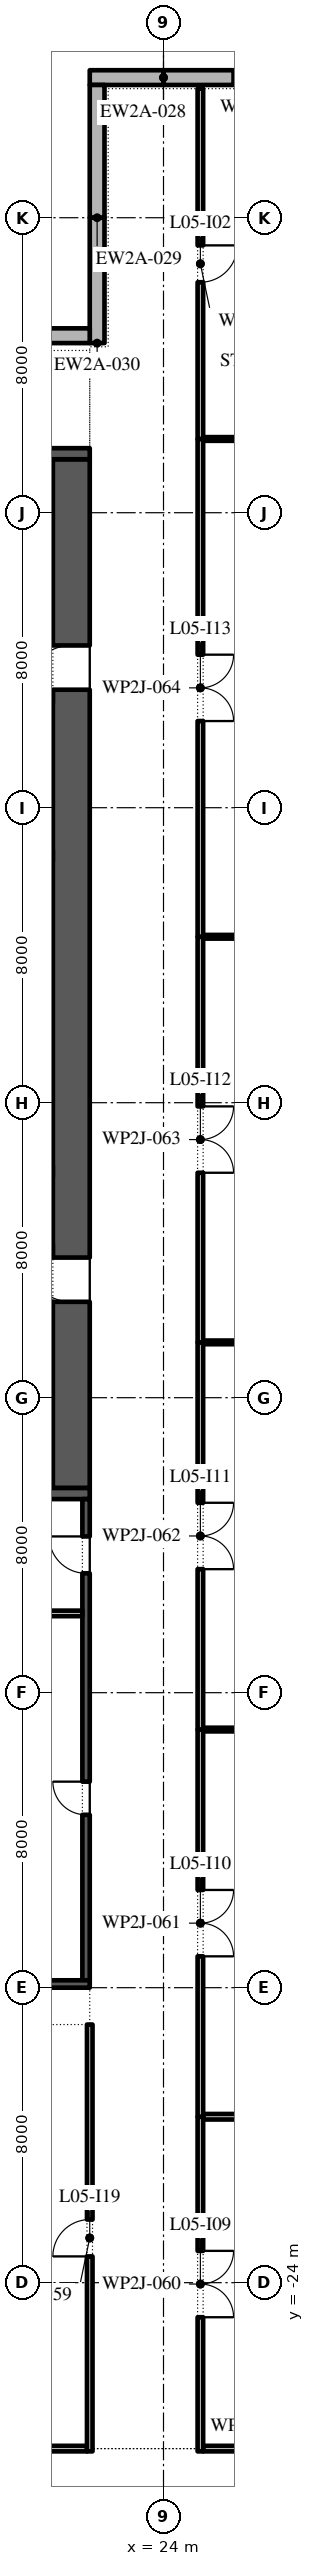
"""IFC4 building model, lengths in metres.
Left out: names, types, materials, properties, quantities, classifications, styles, units other than length and angle.
Written with IfcOpenShell. Run it as: python <this file> out.ifc"""

import sys

from ifc_helpers import new_model, si_unit, direction, frame, frame_2d, origin, place, context, subcontext, project, spatial, polyline, rectangle, outline, extrude, element, fill, save


model = new_model("IFC4")
c1 = context("Model", 3, precision=1e-05, world=origin(), true_north=direction((0.0, 1.0)))
c2 = subcontext(c1, "Body", "Model", "MODEL_VIEW")
j1 = project(units=[si_unit("LENGTHUNIT", "METRE"), si_unit("PLANEANGLEUNIT", "RADIAN")], contexts=[c1])
p1 = place(None, origin())
s1 = spatial("IfcSite", under=j1, at=p1, CompositionType="ELEMENT")
p2 = place(p1, origin())
s2 = spatial("IfcBuilding", under=s1, at=p2, CompositionType="ELEMENT")
p3 = place(p2, frame((0.0, 0.0, 28.8)))
s3 = spatial("IfcBuildingStorey", under=s2, at=p3, CompositionType="ELEMENT", Elevation=28.8)
p4 = place(p3, frame((32.0, 35.8, 0.0), z_axis=(0.0, 0.0, 1.0), x_axis=(-1.0, 0.0, 0.0)))
e1 = element("IfcWall", 1, at=p4, inside=s3, PredefinedType="STANDARD", context=c2, shape_type="SweptSolid", body=[
    extrude(rectangle(XDim=8.0, YDim=0.4, at=frame_2d((4.0, 0.0))), origin(), (0.0, 0.0, 1.0), 4.35),
])
p5 = place(p4, frame((1.9, 0.0, 0.9)))
e2 = element("IfcOpeningElement", 2, at=p5, cuts=e1, PredefinedType="OPENING", context=c2, shape_type="SweptSolid", body=[
    extrude(outline(polyline([(0.0, 0.0), (1.8, 0.0), (1.8, 1.425), (1.784, 1.646), (1.738, 1.864), (1.661, 2.072), (1.556, 2.268), (1.425, 2.447), (1.269, 2.605), (1.093, 2.741), (0.9, 2.85), (0.707, 2.741), (0.531, 2.605), (0.375, 2.447), (0.244, 2.268), (0.139, 2.072), (0.062, 1.864), (0.016, 1.646), (0.0, 1.425), (0.0, 0.0)])), frame((0.0, 0.21, 0.0), z_axis=(0.0, -1.0, 0.0), x_axis=(1.0, 0.0, 0.0)), (0.0, 0.0, 1.0), 0.42),
])
p6 = place(p4, frame((4.3, 0.0, 0.9)))
e3 = element("IfcOpeningElement", 3, at=p6, cuts=e1, PredefinedType="OPENING", context=c2, shape_type="SweptSolid", body=[
    extrude(outline(polyline([(0.0, 0.0), (1.8, 0.0), (1.8, 1.425), (1.784, 1.646), (1.738, 1.864), (1.661, 2.072), (1.556, 2.268), (1.425, 2.447), (1.269, 2.605), (1.093, 2.741), (0.9, 2.85), (0.707, 2.741), (0.531, 2.605), (0.375, 2.447), (0.244, 2.268), (0.139, 2.072), (0.062, 1.864), (0.016, 1.646), (0.0, 1.425), (0.0, 0.0)])), frame((0.0, 0.21, 0.0), z_axis=(0.0, -1.0, 0.0), x_axis=(1.0, 0.0, 0.0)), (0.0, 0.0, 1.0), 0.42),
])
p7 = place(p3, frame((24.0, 35.8, 0.0), z_axis=(0.0, 0.0, 1.0), x_axis=(-1.0, 0.0, 0.0)))
e4 = element("IfcWall", 4, at=p7, inside=s3, PredefinedType="STANDARD", context=c2, shape_type="SweptSolid", body=[
    extrude(rectangle(XDim=2.0, YDim=0.4, at=frame_2d((1.0, 0.0))), origin(), (0.0, 0.0, 1.0), 4.35),
])
p8 = place(p3, frame((22.2, 35.6, 0.0), z_axis=(0.0, 0.0, 1.0), x_axis=(0.0, -1.0, 0.0)))
e5 = element("IfcWall", 5, at=p8, inside=s3, PredefinedType="STANDARD", context=c2, shape_type="SweptSolid", body=[
    extrude(rectangle(XDim=3.6, YDim=0.4, at=frame_2d((1.8, 0.0))), origin(), (0.0, 0.0, 1.0), 4.35),
])
p9 = place(p3, frame((22.2, 32.0, 0.0), z_axis=(0.0, 0.0, 1.0), x_axis=(0.0, -1.0, 0.0)))
e6 = element("IfcWall", 6, at=p9, inside=s3, PredefinedType="STANDARD", context=c2, shape_type="SweptSolid", body=[
    extrude(rectangle(XDim=3.4, YDim=0.4, at=frame_2d((1.7, 0.0))), origin(), (0.0, 0.0, 1.0), 4.35),
])
p10 = place(p3, frame((22.0, 28.8, 0.0), z_axis=(0.0, 0.0, 1.0), x_axis=(-1.0, 0.0, 0.0)))
e7 = element("IfcWall", 7, at=p10, inside=s3, PredefinedType="STANDARD", context=c2, shape_type="SweptSolid", body=[
    extrude(rectangle(XDim=6.0, YDim=0.4, at=frame_2d((3.0, 0.0))), origin(), (0.0, 0.0, 1.0), 4.35),
])
p11 = place(p3, frame((21.5, -2.45, 0.0), z_axis=(0.0, 0.0, 1.0), x_axis=(0.0, 1.0, 0.0)))
e8 = element("IfcWall", 8, at=p11, inside=s3, PredefinedType="SHEAR", context=c2, shape_type="SweptSolid", body=[
    extrude(rectangle(XDim=27.9, YDim=1.0, at=frame_2d((13.95, 0.0))), origin(), (0.0, 0.0, 1.0), 4.35),
])
p12 = place(p11, frame((5.05, 0.0, 0.0)))
e9 = element("IfcOpeningElement", 9, at=p12, cuts=e8, PredefinedType="OPENING", context=c2, shape_type="SweptSolid", body=[
    extrude(rectangle(XDim=1.2, YDim=2.1, at=frame_2d((0.6, 1.05))), frame((0.0, 0.51, 0.0), z_axis=(0.0, -1.0, 0.0), x_axis=(1.0, 0.0, 0.0)), (0.0, 0.0, 1.0), 1.02),
])
p13 = place(p11, frame((21.65, 0.0, 0.0)))
e10 = element("IfcOpeningElement", 10, at=p13, cuts=e8, PredefinedType="OPENING", context=c2, shape_type="SweptSolid", body=[
    extrude(rectangle(XDim=1.2, YDim=2.1, at=frame_2d((0.6, 1.05))), frame((0.0, 0.51, 0.0), z_axis=(0.0, -1.0, 0.0), x_axis=(1.0, 0.0, 0.0)), (0.0, 0.0, 1.0), 1.02),
])
for number, where, z_axis, x_axis in (
    (11, (10.0, -2.6, 0.0), (0.0, 0.0, 1.0), (1.0, 0.0, 0.0)),
    (12, (10.0, 25.6, 0.0), (0.0, 0.0, 1.0), (1.0, 0.0, 0.0)),
):
    element("IfcWall", number, at=place(p3, frame(where, z_axis=z_axis, x_axis=x_axis)), inside=s3, PredefinedType="SHEAR", context=c2, shape_type="SweptSolid", body=[
        extrude(rectangle(XDim=12.0, YDim=0.3, at=frame_2d((6.0, 0.0))), origin(), (0.0, 0.0, 1.0), 4.35),
    ])
for number, where, z_axis, x_axis in (
    (13, (17.3, 4.0, 0.0), (0.0, 0.0, 1.0), (1.0, 0.0, 0.0)),
    (14, (17.3, 19.0, 0.0), (0.0, 0.0, 1.0), (1.0, 0.0, 0.0)),
):
    element("IfcWall", number, at=place(p3, frame(where, z_axis=z_axis, x_axis=x_axis)), inside=s3, PredefinedType="SHEAR", context=c2, shape_type="SweptSolid", body=[
        extrude(rectangle(XDim=3.7, YDim=0.3, at=frame_2d((1.85, 0.0))), origin(), (0.0, 0.0, 1.0), 4.35),
    ])
p14 = place(p3, frame((21.9, -15.8, 0.0), z_axis=(0.0, 0.0, 1.0), x_axis=(0.0, 1.0, 0.0)))
e15 = element("IfcWall", 15, at=p14, inside=s3, PredefinedType="SHEAR", context=c2, shape_type="SweptSolid", body=[
    extrude(rectangle(XDim=13.05, YDim=0.2, at=frame_2d((6.525, 0.0))), origin(), (0.0, 0.0, 1.0), 4.35),
])
p15 = place(p14, frame((4.488, 0.0, 0.0)))
e16 = element("IfcOpeningElement", 16, at=p15, cuts=e15, PredefinedType="OPENING", context=c2, shape_type="SweptSolid", body=[
    extrude(rectangle(XDim=0.9, YDim=2.1, at=frame_2d((0.45, 1.05))), frame((0.0, 0.11, 0.0), z_axis=(0.0, -1.0, 0.0), x_axis=(1.0, 0.0, 0.0)), (0.0, 0.0, 1.0), 0.22),
])
p16 = place(p14, frame((11.038, 0.0, 0.0)))
e17 = element("IfcOpeningElement", 17, at=p16, cuts=e15, PredefinedType="OPENING", context=c2, shape_type="SweptSolid", body=[
    extrude(rectangle(XDim=1.0, YDim=2.1, at=frame_2d((0.5, 1.05))), frame((0.0, 0.11, 0.0), z_axis=(0.0, -1.0, 0.0), x_axis=(1.0, 0.0, 0.0)), (0.0, 0.0, 1.0), 0.22),
])
p17 = place(p3, frame((10.0, -15.9, 0.0), z_axis=(0.0, 0.0, 1.0), x_axis=(1.0, 0.0, 0.0)))
e18 = element("IfcWall", 18, at=p17, inside=s3, PredefinedType="SHEAR", context=c2, shape_type="SweptSolid", body=[
    extrude(rectangle(XDim=12.0, YDim=0.2, at=frame_2d((6.0, 0.0))), origin(), (0.0, 0.0, 1.0), 4.35),
])
p18 = place(p3, frame((16.075, -5.85, 0.0), z_axis=(0.0, 0.0, 1.0), x_axis=(1.0, 0.0, 0.0)))
e19 = element("IfcWall", 19, at=p18, inside=s3, PredefinedType="PARTITIONING", context=c2, shape_type="SweptSolid", body=[
    extrude(rectangle(XDim=5.725, YDim=0.15, at=frame_2d((2.863, 0.0))), origin(), (0.0, 0.0, 1.0), 4.35),
])
p19 = place(p3, frame((10.4, -28.5, 0.0), z_axis=(0.0, 0.0, 1.0), x_axis=(1.0, 0.0, 0.0)))
e20 = element("IfcWall", 20, at=p19, inside=s3, PredefinedType="PARTITIONING", context=c2, shape_type="SweptSolid", body=[
    extrude(rectangle(XDim=11.525, YDim=0.15, at=frame_2d((5.763, 0.0))), origin(), (0.0, 0.0, 1.0), 4.35),
])
p20 = place(p3, frame((25.075, -28.5, 0.0), z_axis=(0.0, 0.0, 1.0), x_axis=(1.0, 0.0, 0.0)))
e21 = element("IfcWall", 21, at=p20, inside=s3, PredefinedType="PARTITIONING", context=c2, shape_type="SweptSolid", body=[
    extrude(rectangle(XDim=1.925, YDim=0.15, at=frame_2d((0.962, 0.0))), origin(), (0.0, 0.0, 1.0), 4.35),
])
p21 = place(p3, frame((25.075, -19.5, 0.0), z_axis=(0.0, 0.0, 1.0), x_axis=(1.0, 0.0, 0.0)))
e22 = element("IfcWall", 22, at=p21, inside=s3, PredefinedType="PARTITIONING", context=c2, shape_type="SweptSolid", body=[
    extrude(rectangle(XDim=6.625, YDim=0.15, at=frame_2d((3.312, 0.0))), origin(), (0.0, 0.0, 1.0), 4.35),
])
p22 = place(p3, frame((25.075, -9.0, 0.0), z_axis=(0.0, 0.0, 1.0), x_axis=(1.0, 0.0, 0.0)))
e23 = element("IfcWall", 23, at=p22, inside=s3, PredefinedType="PARTITIONING", context=c2, shape_type="SweptSolid", body=[
    extrude(rectangle(XDim=16.425, YDim=0.1, at=frame_2d((8.212, 0.0))), origin(), (0.0, 0.0, 1.0), 4.35),
])
p23 = place(p3, frame((25.075, 1.5, 0.0), z_axis=(0.0, 0.0, 1.0), x_axis=(1.0, 0.0, 0.0)))
e24 = element("IfcWall", 24, at=p23, inside=s3, PredefinedType="PARTITIONING", context=c2, shape_type="SweptSolid", body=[
    extrude(rectangle(XDim=18.425, YDim=0.1, at=frame_2d((9.212, 0.0))), origin(), (0.0, 0.0, 1.0), 4.35),
])
p24 = place(p3, frame((25.075, 12.5, 0.0), z_axis=(0.0, 0.0, 1.0), x_axis=(1.0, 0.0, 0.0)))
e25 = element("IfcWall", 25, at=p24, inside=s3, PredefinedType="PARTITIONING", context=c2, shape_type="SweptSolid", body=[
    extrude(rectangle(XDim=6.625, YDim=0.1, at=frame_2d((3.312, 0.0))), origin(), (0.0, 0.0, 1.0), 4.35),
])
p25 = place(p3, frame((25.075, 26.0, 0.0), z_axis=(0.0, 0.0, 1.0), x_axis=(1.0, 0.0, 0.0)))
e26 = element("IfcWall", 26, at=p25, inside=s3, PredefinedType="PARTITIONING", context=c2, shape_type="SweptSolid", body=[
    extrude(rectangle(XDim=8.925, YDim=0.1, at=frame_2d((4.462, 0.0))), origin(), (0.0, 0.0, 1.0), 4.35),
])
p26 = place(p3, frame((22.0, -28.575, 0.0), z_axis=(0.0, 0.0, 1.0), x_axis=(0.0, 1.0, 0.0)))
e27 = element("IfcWall", 27, at=p26, inside=s3, PredefinedType="PARTITIONING", context=c2, shape_type="SweptSolid", body=[
    extrude(rectangle(XDim=11.575, YDim=0.15, at=frame_2d((5.788, 0.0))), origin(), (0.0, 0.0, 1.0), 4.35),
])
p27 = place(p26, frame((5.288, 0.0, 0.0)))
e28 = element("IfcOpeningElement", 28, at=p27, cuts=e27, PredefinedType="OPENING", context=c2, shape_type="SweptSolid", body=[
    extrude(rectangle(XDim=1.0, YDim=2.1, at=frame_2d((0.5, 1.05))), frame((0.0, 0.085, 0.0), z_axis=(0.0, -1.0, 0.0), x_axis=(1.0, 0.0, 0.0)), (0.0, 0.0, 1.0), 0.17),
])
p28 = place(p3, frame((25.0, -28.575, 0.0), z_axis=(0.0, 0.0, 1.0), x_axis=(0.0, 1.0, 0.0)))
e29 = element("IfcWall", 29, at=p28, inside=s3, PredefinedType="PARTITIONING", context=c2, shape_type="SweptSolid", body=[
    extrude(rectangle(XDim=9.075, YDim=0.15, at=frame_2d((4.538, 0.0))), origin(), (0.0, 0.0, 1.0), 4.35),
])
p29 = place(p28, frame((3.637, 0.0, 0.0)))
e30 = element("IfcOpeningElement", 30, at=p29, cuts=e29, PredefinedType="OPENING", context=c2, shape_type="SweptSolid", body=[
    extrude(rectangle(XDim=1.8, YDim=2.1, at=frame_2d((0.9, 1.05))), frame((0.0, 0.085, 0.0), z_axis=(0.0, -1.0, 0.0), x_axis=(1.0, 0.0, 0.0)), (0.0, 0.0, 1.0), 0.17),
])
p30 = place(p3, frame((25.0, -19.5, 0.0), z_axis=(0.0, 0.0, 1.0), x_axis=(0.0, 1.0, 0.0)))
e31 = element("IfcWall", 31, at=p30, inside=s3, PredefinedType="PARTITIONING", context=c2, shape_type="SweptSolid", body=[
    extrude(rectangle(XDim=10.5, YDim=0.15, at=frame_2d((5.25, 0.0))), origin(), (0.0, 0.0, 1.0), 4.35),
])
p31 = place(p30, frame((4.35, 0.0, 0.0)))
e32 = element("IfcOpeningElement", 32, at=p31, cuts=e31, PredefinedType="OPENING", context=c2, shape_type="SweptSolid", body=[
    extrude(rectangle(XDim=1.8, YDim=2.1, at=frame_2d((0.9, 1.05))), frame((0.0, 0.085, 0.0), z_axis=(0.0, -1.0, 0.0), x_axis=(1.0, 0.0, 0.0)), (0.0, 0.0, 1.0), 0.17),
])
p32 = place(p3, frame((25.0, -9.0, 0.0), z_axis=(0.0, 0.0, 1.0), x_axis=(0.0, 1.0, 0.0)))
e33 = element("IfcWall", 33, at=p32, inside=s3, PredefinedType="PARTITIONING", context=c2, shape_type="SweptSolid", body=[
    extrude(rectangle(XDim=10.5, YDim=0.15, at=frame_2d((5.25, 0.0))), origin(), (0.0, 0.0, 1.0), 4.35),
])
p33 = place(p32, frame((4.35, 0.0, 0.0)))
e34 = element("IfcOpeningElement", 34, at=p33, cuts=e33, PredefinedType="OPENING", context=c2, shape_type="SweptSolid", body=[
    extrude(rectangle(XDim=1.8, YDim=2.1, at=frame_2d((0.9, 1.05))), frame((0.0, 0.085, 0.0), z_axis=(0.0, -1.0, 0.0), x_axis=(1.0, 0.0, 0.0)), (0.0, 0.0, 1.0), 0.17),
])
p34 = place(p3, frame((25.0, 1.5, 0.0), z_axis=(0.0, 0.0, 1.0), x_axis=(0.0, 1.0, 0.0)))
e35 = element("IfcWall", 35, at=p34, inside=s3, PredefinedType="PARTITIONING", context=c2, shape_type="SweptSolid", body=[
    extrude(rectangle(XDim=11.0, YDim=0.15, at=frame_2d((5.5, 0.0))), origin(), (0.0, 0.0, 1.0), 4.35),
])
p35 = place(p34, frame((4.6, 0.0, 0.0)))
e36 = element("IfcOpeningElement", 36, at=p35, cuts=e35, PredefinedType="OPENING", context=c2, shape_type="SweptSolid", body=[
    extrude(rectangle(XDim=1.8, YDim=2.1, at=frame_2d((0.9, 1.05))), frame((0.0, 0.085, 0.0), z_axis=(0.0, -1.0, 0.0), x_axis=(1.0, 0.0, 0.0)), (0.0, 0.0, 1.0), 0.17),
])
p36 = place(p3, frame((25.0, 12.5, 0.0), z_axis=(0.0, 0.0, 1.0), x_axis=(0.0, 1.0, 0.0)))
e37 = element("IfcWall", 37, at=p36, inside=s3, PredefinedType="PARTITIONING", context=c2, shape_type="SweptSolid", body=[
    extrude(rectangle(XDim=13.5, YDim=0.15, at=frame_2d((6.75, 0.0))), origin(), (0.0, 0.0, 1.0), 4.35),
])
p37 = place(p36, frame((5.85, 0.0, 0.0)))
e38 = element("IfcOpeningElement", 38, at=p37, cuts=e37, PredefinedType="OPENING", context=c2, shape_type="SweptSolid", body=[
    extrude(rectangle(XDim=1.8, YDim=2.1, at=frame_2d((0.9, 1.05))), frame((0.0, 0.085, 0.0), z_axis=(0.0, -1.0, 0.0), x_axis=(1.0, 0.0, 0.0)), (0.0, 0.0, 1.0), 0.17),
])
p38 = place(p3, frame((25.0, 26.0, 0.0), z_axis=(0.0, 0.0, 1.0), x_axis=(0.0, 1.0, 0.0)))
e39 = element("IfcWall", 39, at=p38, inside=s3, PredefinedType="PARTITIONING", context=c2, shape_type="SweptSolid", body=[
    extrude(rectangle(XDim=9.5, YDim=0.15, at=frame_2d((4.75, 0.0))), origin(), (0.0, 0.0, 1.0), 4.35),
])
p39 = place(p38, frame((4.25, 0.0, 0.0)))
e40 = element("IfcOpeningElement", 40, at=p39, cuts=e39, PredefinedType="OPENING", context=c2, shape_type="SweptSolid", body=[
    extrude(rectangle(XDim=1.0, YDim=2.1, at=frame_2d((0.5, 1.05))), frame((0.0, 0.085, 0.0), z_axis=(0.0, -1.0, 0.0), x_axis=(1.0, 0.0, 0.0)), (0.0, 0.0, 1.0), 0.17),
])
p40 = place(p6, origin())
e41 = element("IfcWindow", 41, at=p40, inside=s3, PartitioningType="DOUBLE_PANEL_VERTICAL", PredefinedType="WINDOW", context=c2, shape_type="SweptSolid", body=[
    extrude(outline(polyline([(0.0, 0.0), (1.8, 0.0), (1.8, 1.425), (1.784, 1.646), (1.738, 1.864), (1.661, 2.072), (1.556, 2.268), (1.425, 2.447), (1.269, 2.605), (1.093, 2.741), (0.9, 2.85), (0.707, 2.741), (0.531, 2.605), (0.375, 2.447), (0.244, 2.268), (0.139, 2.072), (0.062, 1.864), (0.016, 1.646), (0.0, 1.425), (0.0, 0.0)])), frame((0.0, 0.03, 0.0), z_axis=(0.0, -1.0, 0.0), x_axis=(1.0, 0.0, 0.0)), (0.0, 0.0, 1.0), 0.06),
])
fill(e3, e41)
p41 = place(p12, origin())
e42 = element("IfcDoor", 42, at=p41, inside=s3, OperationType="SINGLE_SWING_LEFT", PredefinedType="DOOR", context=c2, shape_type="SweptSolid", body=[
    extrude(rectangle(XDim=1.2, YDim=2.1, at=frame_2d((0.6, 1.05))), frame((0.0, 0.025, 0.0), z_axis=(0.0, -1.0, 0.0), x_axis=(1.0, 0.0, 0.0)), (0.0, 0.0, 1.0), 0.05),
])
fill(e9, e42)
p42 = place(p13, origin())
e43 = element("IfcDoor", 43, at=p42, inside=s3, OperationType="SINGLE_SWING_RIGHT", PredefinedType="DOOR", context=c2, shape_type="SweptSolid", body=[
    extrude(rectangle(XDim=1.2, YDim=2.1, at=frame_2d((0.6, 1.05))), frame((0.0, 0.025, 0.0), z_axis=(0.0, -1.0, 0.0), x_axis=(1.0, 0.0, 0.0)), (0.0, 0.0, 1.0), 0.05),
])
fill(e10, e43)
p43 = place(p15, origin())
e44 = element("IfcDoor", 44, at=p43, inside=s3, OperationType="SINGLE_SWING_LEFT", PredefinedType="DOOR", context=c2, shape_type="SweptSolid", body=[
    extrude(rectangle(XDim=0.9, YDim=2.1, at=frame_2d((0.45, 1.05))), frame((0.0, 0.1, 0.0), z_axis=(0.0, -1.0, 0.0), x_axis=(1.0, 0.0, 0.0)), (0.0, 0.0, 1.0), 0.05),
])
fill(e16, e44)
p44 = place(p16, origin())
e45 = element("IfcDoor", 45, at=p44, inside=s3, OperationType="SINGLE_SWING_LEFT", PredefinedType="DOOR", context=c2, shape_type="SweptSolid", body=[
    extrude(rectangle(XDim=1.0, YDim=2.1, at=frame_2d((0.5, 1.05))), frame((0.0, 0.1, 0.0), z_axis=(0.0, -1.0, 0.0), x_axis=(1.0, 0.0, 0.0)), (0.0, 0.0, 1.0), 0.05),
])
fill(e17, e45)
p45 = place(p39, frame((1.0, 0.0, 0.0), z_axis=(0.0, 0.0, 1.0), x_axis=(-1.0, 0.0, 0.0)))
e46 = element("IfcDoor", 46, at=p45, inside=s3, OperationType="SINGLE_SWING_RIGHT", PredefinedType="DOOR", context=c2, shape_type="SweptSolid", body=[
    extrude(rectangle(XDim=1.0, YDim=2.1, at=frame_2d((0.5, 1.05))), frame((0.0, 0.025, 0.0), z_axis=(0.0, -1.0, 0.0), x_axis=(1.0, 0.0, 0.0)), (0.0, 0.0, 1.0), 0.05),
])
fill(e40, e46)
p46 = place(p29, frame((1.8, 0.0, 0.0), z_axis=(0.0, 0.0, 1.0), x_axis=(-1.0, 0.0, 0.0)))
e47 = element("IfcDoor", 47, at=p46, inside=s3, OperationType="SINGLE_SWING_RIGHT", PredefinedType="DOOR", context=c2, shape_type="SweptSolid", body=[
    extrude(rectangle(XDim=1.8, YDim=2.1, at=frame_2d((0.9, 1.05))), frame((0.0, 0.025, 0.0), z_axis=(0.0, -1.0, 0.0), x_axis=(1.0, 0.0, 0.0)), (0.0, 0.0, 1.0), 0.05),
])
fill(e30, e47)
p47 = place(p31, frame((1.8, 0.0, 0.0), z_axis=(0.0, 0.0, 1.0), x_axis=(-1.0, 0.0, 0.0)))
e48 = element("IfcDoor", 48, at=p47, inside=s3, OperationType="SINGLE_SWING_LEFT", PredefinedType="DOOR", context=c2, shape_type="SweptSolid", body=[
    extrude(rectangle(XDim=1.8, YDim=2.1, at=frame_2d((0.9, 1.05))), frame((0.0, 0.025, 0.0), z_axis=(0.0, -1.0, 0.0), x_axis=(1.0, 0.0, 0.0)), (0.0, 0.0, 1.0), 0.05),
])
fill(e32, e48)
p48 = place(p33, frame((1.8, 0.0, 0.0), z_axis=(0.0, 0.0, 1.0), x_axis=(-1.0, 0.0, 0.0)))
e49 = element("IfcDoor", 49, at=p48, inside=s3, OperationType="SINGLE_SWING_LEFT", PredefinedType="DOOR", context=c2, shape_type="SweptSolid", body=[
    extrude(rectangle(XDim=1.8, YDim=2.1, at=frame_2d((0.9, 1.05))), frame((0.0, 0.025, 0.0), z_axis=(0.0, -1.0, 0.0), x_axis=(1.0, 0.0, 0.0)), (0.0, 0.0, 1.0), 0.05),
])
fill(e34, e49)
p49 = place(p35, frame((1.8, 0.0, 0.0), z_axis=(0.0, 0.0, 1.0), x_axis=(-1.0, 0.0, 0.0)))
e50 = element("IfcDoor", 50, at=p49, inside=s3, OperationType="SINGLE_SWING_LEFT", PredefinedType="DOOR", context=c2, shape_type="SweptSolid", body=[
    extrude(rectangle(XDim=1.8, YDim=2.1, at=frame_2d((0.9, 1.05))), frame((0.0, 0.025, 0.0), z_axis=(0.0, -1.0, 0.0), x_axis=(1.0, 0.0, 0.0)), (0.0, 0.0, 1.0), 0.05),
])
fill(e36, e50)
p50 = place(p37, frame((1.8, 0.0, 0.0), z_axis=(0.0, 0.0, 1.0), x_axis=(-1.0, 0.0, 0.0)))
e51 = element("IfcDoor", 51, at=p50, inside=s3, OperationType="SINGLE_SWING_LEFT", PredefinedType="DOOR", context=c2, shape_type="SweptSolid", body=[
    extrude(rectangle(XDim=1.8, YDim=2.1, at=frame_2d((0.9, 1.05))), frame((0.0, 0.025, 0.0), z_axis=(0.0, -1.0, 0.0), x_axis=(1.0, 0.0, 0.0)), (0.0, 0.0, 1.0), 0.05),
])
fill(e38, e51)
p51 = place(p27, origin())
e52 = element("IfcDoor", 52, at=p51, inside=s3, OperationType="SINGLE_SWING_RIGHT", PredefinedType="DOOR", context=c2, shape_type="SweptSolid", body=[
    extrude(rectangle(XDim=1.0, YDim=2.1, at=frame_2d((0.5, 1.05))), frame((0.0, 0.025, 0.0), z_axis=(0.0, -1.0, 0.0), x_axis=(1.0, 0.0, 0.0)), (0.0, 0.0, 1.0), 0.05),
])
fill(e28, e52)
save(model, sys.argv[1])
